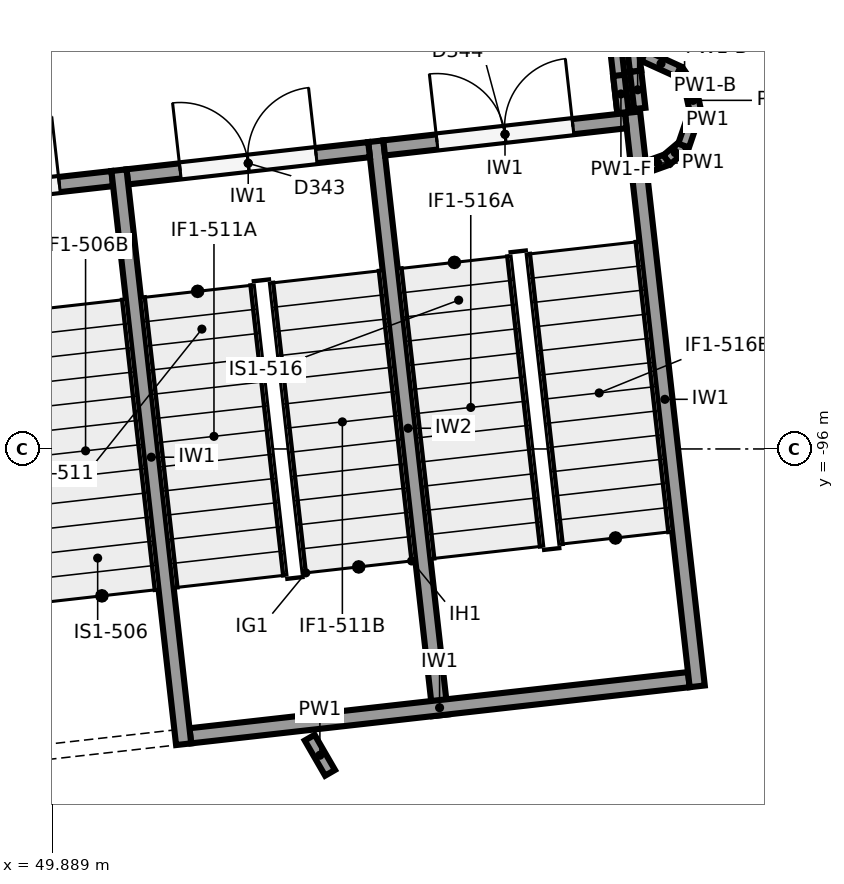
"""IFC4 building model, lengths in metres.
Left out: names, types, materials, properties, quantities, classifications, styles, units other than length and angle.
Written with IfcOpenShell. Run it as: python <this file> out.ifc"""

import sys

from ifc_helpers import new_model, si_unit, direction, frame, frame_2d, origin, place, context, subcontext, project, spatial, rectangle, extrude, element, fill, save


model = new_model("IFC4")
c1 = context("Model", 3, precision=1e-05, world=origin(), true_north=direction((0.0, 1.0)))
c2 = subcontext(c1, "Body", "Model", "MODEL_VIEW")
j1 = project(units=[si_unit("LENGTHUNIT", "METRE"), si_unit("PLANEANGLEUNIT", "RADIAN")], contexts=[c1])
p1 = place(None, origin())
s1 = spatial("IfcSite", under=j1, at=p1, CompositionType="ELEMENT")
p2 = place(p1, origin())
s2 = spatial("IfcBuilding", under=s1, at=p2, CompositionType="ELEMENT")
p3 = place(p2, frame((0.0, 0.0, -4.0)))
s3 = spatial("IfcBuildingStorey", under=s2, at=p3, CompositionType="ELEMENT", Elevation=-4.0)
p4 = place(p3, frame((51.621, -99.885, -1.2), z_axis=(0.0, 0.0, 1.0), x_axis=(-0.111947429915, 0.993714130389, 0.0)))
e1 = element("IfcWall", 1, at=p4, inside=s3, PredefinedType="SHEAR", context=c2, shape_type="SweptSolid", body=[
    extrude(rectangle(XDim=7.6, YDim=0.2, at=frame_2d((3.8, 0.0))), origin(), (0.0, 0.0, 1.0), 4.8),
])
p5 = place(p3, frame((58.378, -99.123, -1.2), z_axis=(0.0, 0.0, 1.0), x_axis=(-0.111982724367, 0.993710153638, 0.0)))
e2 = element("IfcWall", 2, at=p5, inside=s3, PredefinedType="SHEAR", context=c2, shape_type="SweptSolid", body=[
    extrude(rectangle(XDim=7.6, YDim=0.2, at=frame_2d((3.8, 0.0))), origin(), (0.0, 0.0, 1.0), 4.8),
])
for number, where, z_axis, x_axis in (
    (3, (44.951, -100.535, -1.2), (0.0, 0.0, 1.0), (0.994, 0.112, 0.0)),
    (4, (51.709, -99.774, -1.2), (0.0, 0.0, 1.0), (0.994, 0.112, 0.0)),
):
    element("IfcWall", number, at=place(p3, frame(where, z_axis=z_axis, x_axis=x_axis)), inside=s3, PredefinedType="SHEAR", context=c2, shape_type="SweptSolid", body=[
        extrude(rectangle(XDim=6.6, YDim=0.2, at=frame_2d((3.3, 0.0))), origin(), (0.0, 0.0, 1.0), 4.8),
    ])
p6 = place(p3, frame((54.999, -99.504, -1.2), z_axis=(0.0, 0.0, 1.0), x_axis=(-0.111982724367, 0.993710153638, 0.0)))
e5 = element("IfcWall", 5, at=p6, inside=s3, PredefinedType="SHEAR", context=c2, shape_type="SweptSolid", body=[
    extrude(rectangle(XDim=7.6, YDim=0.2, at=frame_2d((3.8, 0.0))), origin(), (0.0, 0.0, 1.0), 4.8),
])
p7 = place(p3, frame((47.502, -92.801, -1.2), z_axis=(0.0, 0.0, 1.0), x_axis=(0.993707560215, 0.112005735442, 0.0)))
e6 = element("IfcWall", 6, at=p7, inside=s3, PredefinedType="SHEAR", context=c2, shape_type="SweptSolid", body=[
    extrude(rectangle(XDim=3.2, YDim=0.2, at=frame_2d((1.6, 0.0))), origin(), (0.0, 0.0, 1.0), 4.8),
])
p8 = place(p7, frame((0.7, 0.0, 1.2)))
e7 = element("IfcOpeningElement", 7, at=p8, cuts=e6, PredefinedType="OPENING", context=c2, shape_type="SweptSolid", body=[
    extrude(rectangle(XDim=1.8, YDim=2.1, at=frame_2d((0.9, 1.05))), frame((0.0, 0.11, 0.0), z_axis=(0.0, -1.0, 0.0), x_axis=(1.0, 0.0, 0.0)), (0.0, 0.0, 1.0), 0.22),
])
p9 = place(p3, frame((50.88, -92.42, -1.2), z_axis=(0.0, 0.0, 1.0), x_axis=(0.993707560215, 0.112005735442, 0.0)))
e8 = element("IfcWall", 8, at=p9, inside=s3, PredefinedType="SHEAR", context=c2, shape_type="SweptSolid", body=[
    extrude(rectangle(XDim=3.2, YDim=0.2, at=frame_2d((1.6, 0.0))), origin(), (0.0, 0.0, 1.0), 4.8),
])
p10 = place(p9, frame((0.7, 0.0, 1.2)))
e9 = element("IfcOpeningElement", 9, at=p10, cuts=e8, PredefinedType="OPENING", context=c2, shape_type="SweptSolid", body=[
    extrude(rectangle(XDim=1.8, YDim=2.1, at=frame_2d((0.9, 1.05))), frame((0.0, 0.11, 0.0), z_axis=(0.0, -1.0, 0.0), x_axis=(1.0, 0.0, 0.0)), (0.0, 0.0, 1.0), 0.22),
])
p11 = place(p3, frame((54.259, -92.04, -1.2), z_axis=(0.0, 0.0, 1.0), x_axis=(0.993717005286, 0.11192190762, 0.0)))
e10 = element("IfcWall", 10, at=p11, inside=s3, PredefinedType="SHEAR", context=c2, shape_type="SweptSolid", body=[
    extrude(rectangle(XDim=3.2, YDim=0.2, at=frame_2d((1.6, 0.0))), origin(), (0.0, 0.0, 1.0), 4.8),
])
p12 = place(p11, frame((0.7, 0.0, 1.2)))
e11 = element("IfcOpeningElement", 11, at=p12, cuts=e10, PredefinedType="OPENING", context=c2, shape_type="SweptSolid", body=[
    extrude(rectangle(XDim=1.8, YDim=2.1, at=frame_2d((0.9, 1.05))), frame((0.0, 0.11, 0.0), z_axis=(0.0, -1.0, 0.0), x_axis=(1.0, 0.0, 0.0)), (0.0, 0.0, 1.0), 0.22),
])
p13 = place(p3, frame((53.547, -100.261, 0.0), z_axis=(0.0, 0.0, 1.0), x_axis=(-0.500460168826, 0.86575956213, 0.0)))
e12 = element("IfcWall", 12, at=p13, inside=s3, PredefinedType="PARTITIONING", context=c2, shape_type="SweptSolid", body=[
    extrude(rectangle(XDim=0.535, YDim=0.15, at=frame_2d((0.267, 0.0))), origin(), (0.0, 0.0, 1.0), 3.6),
])
p14 = place(p3, frame((57.622, -91.52, 0.0), z_axis=(0.0, 0.0, 1.0), x_axis=(-0.112221929923, 0.993683168039, 0.0)))
e13 = element("IfcWall", 13, at=p14, inside=s3, PredefinedType="PARTITIONING", context=c2, shape_type="SweptSolid", body=[
    extrude(rectangle(XDim=0.494, YDim=0.15, at=frame_2d((0.247, 0.0))), origin(), (0.0, 0.0, 1.0), 2.5),
])
p15 = place(p3, frame((57.566, -91.029, 0.0), z_axis=(0.0, 0.0, 1.0), x_axis=(-0.111733745595, 0.993738179852, 0.0)))
e14 = element("IfcWall", 14, at=p15, inside=s3, PredefinedType="PARTITIONING", context=c2, shape_type="SweptSolid", body=[
    extrude(rectangle(XDim=0.988, YDim=0.15, at=frame_2d((0.494, 0.0))), origin(), (0.0, 0.0, 1.0), 2.5),
])
p16 = place(p3, frame((57.402, -91.575, 0.0), z_axis=(0.0, 0.0, 1.0), x_axis=(-0.112018501257, 0.993706121233, 0.0)))
e15 = element("IfcWall", 15, at=p16, inside=s3, PredefinedType="PARTITIONING", context=c2, shape_type="SweptSolid", body=[
    extrude(rectangle(XDim=2.465, YDim=0.15, at=frame_2d((1.232, 0.0))), origin(), (0.0, 0.0, 1.0), 2.5),
])
p17 = place(p3, frame((57.402, -91.575, 2.5), z_axis=(0.0, 0.0, 1.0), x_axis=(-0.111953754949, 0.993713417819, 0.0)))
e16 = element("IfcWall", 16, at=p17, inside=s3, PredefinedType="PARTITIONING", context=c2, shape_type="SweptSolid", body=[
    extrude(rectangle(XDim=0.493, YDim=0.15, at=frame_2d((0.247, 0.0))), origin(), (0.0, 0.0, 1.0), 1.1),
])
p18 = place(p3, frame((57.736, -92.281, 0.0), z_axis=(0.0, 0.0, 1.0), x_axis=(0.941549075512, 0.336875850133, 0.0)))
e17 = element("IfcWall", 17, at=p18, inside=s3, PredefinedType="PARTITIONING", context=c2, shape_type="SweptSolid", body=[
    extrude(rectangle(XDim=0.258, YDim=0.15, at=frame_2d((0.129, 0.0))), origin(), (0.0, 0.0, 1.0), 3.6),
])
p19 = place(p3, frame((57.979, -92.195, 0.0), z_axis=(0.0, 0.0, 1.0), x_axis=(0.763611518969, 0.64567596215, 0.0)))
e18 = element("IfcWall", 18, at=p19, inside=s3, PredefinedType="PARTITIONING", context=c2, shape_type="SweptSolid", body=[
    extrude(rectangle(XDim=0.288, YDim=0.15, at=frame_2d((0.144, 0.0))), origin(), (0.0, 0.0, 1.0), 3.6),
])
p20 = place(p3, frame((58.199, -92.009, 0.0), z_axis=(0.0, 0.0, 1.0), x_axis=(0.323699669456, 0.946159882892, 0.0)))
e19 = element("IfcWall", 19, at=p20, inside=s3, PredefinedType="PARTITIONING", context=c2, shape_type="SweptSolid", body=[
    extrude(rectangle(XDim=0.48, YDim=0.15, at=frame_2d((0.24, 0.0))), origin(), (0.0, 0.0, 1.0), 2.5),
])
p21 = place(p3, frame((58.354, -91.555, 0.0), z_axis=(0.0, 0.0, 1.0), x_axis=(-0.209413753184, 0.977827121723, 0.0)))
e20 = element("IfcWall", 20, at=p21, inside=s3, PredefinedType="PARTITIONING", context=c2, shape_type="SweptSolid", body=[
    extrude(rectangle(XDim=0.289, YDim=0.15, at=frame_2d((0.145, 0.0))), origin(), (0.0, 0.0, 1.0), 2.5),
])
p22 = place(p3, frame((58.293, -91.272, 0.0), z_axis=(0.0, 0.0, 1.0), x_axis=(-0.567101732998, 0.823647755069, 0.0)))
e21 = element("IfcWall", 21, at=p22, inside=s3, PredefinedType="PARTITIONING", context=c2, shape_type="SweptSolid", body=[
    extrude(rectangle(XDim=0.289, YDim=0.15, at=frame_2d((0.145, 0.0))), origin(), (0.0, 0.0, 1.0), 2.5),
])
p23 = place(p3, frame((58.129, -91.034, 0.0), z_axis=(0.0, 0.0, 1.0), x_axis=(-0.910483348767, 0.413545730988, 0.0)))
e22 = element("IfcWall", 22, at=p23, inside=s3, PredefinedType="PARTITIONING", context=c2, shape_type="SweptSolid", body=[
    extrude(rectangle(XDim=0.501, YDim=0.15, at=frame_2d((0.25, 0.0))), origin(), (0.0, 0.0, 1.0), 2.5),
])
p24 = place(p8, origin())
e23 = element("IfcDoor", 23, at=p24, inside=s3, OperationType="DOUBLE_DOOR_SINGLE_SWING", PredefinedType="DOOR", context=c2, shape_type="SweptSolid", body=[
    extrude(rectangle(XDim=1.8, YDim=2.1, at=frame_2d((0.9, 1.05))), frame((0.0, 0.025, 0.0), z_axis=(0.0, -1.0, 0.0), x_axis=(1.0, 0.0, 0.0)), (0.0, 0.0, 1.0), 0.05),
])
fill(e7, e23)
p25 = place(p10, origin())
e24 = element("IfcDoor", 24, at=p25, inside=s3, OperationType="DOUBLE_DOOR_SINGLE_SWING", PredefinedType="DOOR", context=c2, shape_type="SweptSolid", body=[
    extrude(rectangle(XDim=1.8, YDim=2.1, at=frame_2d((0.9, 1.05))), frame((0.0, 0.025, 0.0), z_axis=(0.0, -1.0, 0.0), x_axis=(1.0, 0.0, 0.0)), (0.0, 0.0, 1.0), 0.05),
])
fill(e9, e24)
p26 = place(p12, origin())
e25 = element("IfcDoor", 25, at=p26, inside=s3, OperationType="DOUBLE_DOOR_SINGLE_SWING", PredefinedType="DOOR", context=c2, shape_type="SweptSolid", body=[
    extrude(rectangle(XDim=1.8, YDim=2.1, at=frame_2d((0.9, 1.05))), frame((0.0, 0.025, 0.0), z_axis=(0.0, -1.0, 0.0), x_axis=(1.0, 0.0, 0.0)), (0.0, 0.0, 1.0), 0.05),
])
fill(e11, e25)
save(model, sys.argv[1])
